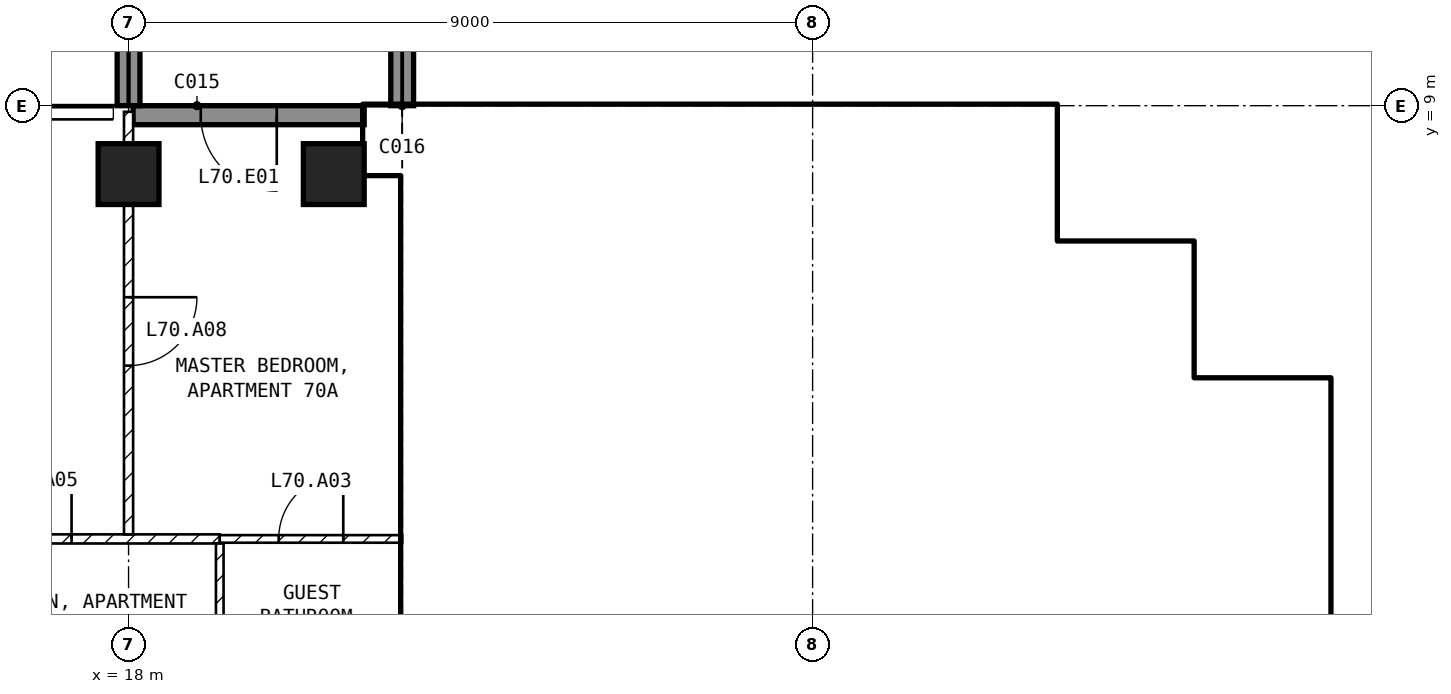
"""IFC4 building model, lengths in metres.
Left out: names, types, materials, properties, quantities, classifications, styles, units other than length and angle.
Written with IfcOpenShell. Run it as: python <this file> out.ifc"""

import sys

from ifc_helpers import new_model, si_unit, direction, frame, frame_2d, origin, origin_2d, place, context, subcontext, project, spatial, rectangle, extrude, element, fill, save


model = new_model("IFC4")
c1 = context("Model", 3, precision=1e-05, world=origin(), true_north=direction((0.0, 1.0)))
c2 = subcontext(c1, "Body", "Model", "MODEL_VIEW")
j1 = project(units=[si_unit("LENGTHUNIT", "METRE"), si_unit("PLANEANGLEUNIT", "RADIAN")], contexts=[c1])
p1 = place(None, origin())
s1 = spatial("IfcSite", under=j1, at=p1, CompositionType="ELEMENT")
p2 = place(p1, origin())
s2 = spatial("IfcBuilding", under=s1, at=p2, CompositionType="ELEMENT")
p3 = place(p2, frame((0.0, 0.0, 274.5)))
s3 = spatial("IfcBuildingStorey", under=s2, at=p3, CompositionType="ELEMENT", Elevation=274.5)
for number, where, z_axis, x_axis in (
    (1, (18.0, 8.1, -0.25), (0.0, 0.0, 1.0), (1.0, 0.0, 0.0)),
    (2, (20.7, 8.1, -0.25), (0.0, 0.0, 1.0), (1.0, 0.0, 0.0)),
):
    element("IfcColumn", number, at=place(p3, frame(where, z_axis=z_axis, x_axis=x_axis)), inside=s3, PredefinedType="COLUMN", context=c2, shape_type="SweptSolid", body=[
        extrude(rectangle(XDim=0.8, YDim=0.8, at=origin_2d()), origin(), (0.0, 0.0, 1.0), 3.5),
    ])
p4 = place(p3, frame((21.1, 8.875, 0.0), z_axis=(0.0, 0.0, 1.0), x_axis=(-1.0, 0.0, 0.0)))
e3 = element("IfcWall", 3, at=p4, inside=s3, PredefinedType="SOLIDWALL", context=c2, shape_type="SweptSolid", body=[
    extrude(rectangle(XDim=3.04, YDim=0.25, at=frame_2d((1.52, 0.0))), origin(), (0.0, 0.0, 1.0), 3.25),
])
p5 = place(p4, frame((1.15, 0.0, 0.0)))
e4 = element("IfcOpeningElement", 4, at=p5, cuts=e3, PredefinedType="OPENING", context=c2, shape_type="SweptSolid", body=[
    extrude(rectangle(XDim=1.0, YDim=2.4, at=frame_2d((0.5, 1.2))), frame((0.0, 0.135, 0.0), z_axis=(0.0, -1.0, 0.0), x_axis=(1.0, 0.0, 0.0)), (0.0, 0.0, 1.0), 0.27),
])
for number, where, z_axis, x_axis in (
    (5, (18.0, 9.0, 0.0), (0.0, 0.0, 1.0), (0.0, 1.0, 0.0)),
    (6, (21.6, 9.0, 0.0), (0.0, 0.0, 1.0), (0.0, 1.0, 0.0)),
):
    element("IfcWall", number, at=place(p3, frame(where, z_axis=z_axis, x_axis=x_axis)), inside=s3, PredefinedType="SOLIDWALL", context=c2, shape_type="SweptSolid", body=[
        extrude(rectangle(XDim=2.7, YDim=0.3, at=frame_2d((1.35, 0.0))), origin(), (0.0, 0.0, 1.0), 3.25),
    ])
p6 = place(p3, frame((33.575, -4.95, 0.0), z_axis=(0.0, 0.0, 1.0), x_axis=(0.0, 1.0, 0.0)))
e7 = element("IfcWall", 7, at=p6, inside=s3, PredefinedType="SHEAR", context=c2, shape_type="SweptSolid", body=[
    extrude(rectangle(XDim=10.35, YDim=0.45, at=frame_2d((5.175, 0.0))), origin(), (0.0, 0.0, 1.0), 3.25),
])
for number, where, z_axis, x_axis in (
    (8, (31.55, 5.175, 0.0), (0.0, 0.0, 1.0), (1.0, 0.0, 0.0)),
    (9, (31.775, 5.4, 0.0), (0.0, 0.0, 1.0), (0.0, 1.0, 0.0)),
    (10, (29.75, 6.975, 0.0), (0.0, 0.0, 1.0), (1.0, 0.0, 0.0)),
    (11, (29.975, 7.2, 0.0), (0.0, 0.0, 1.0), (0.0, 1.0, 0.0)),
):
    element("IfcWall", number, at=place(p3, frame(where, z_axis=z_axis, x_axis=x_axis)), inside=s3, PredefinedType="SHEAR", context=c2, shape_type="SweptSolid", body=[
        extrude(rectangle(XDim=1.8, YDim=0.45, at=frame_2d((0.9, 0.0))), origin(), (0.0, 0.0, 1.0), 3.25),
    ])
p7 = place(p3, frame((21.1, 8.55, 0.0), z_axis=(0.0, 0.0, 1.0), x_axis=(1.0, 0.0, 0.0)))
e12 = element("IfcWall", 12, at=p7, inside=s3, PredefinedType="SHEAR", context=c2, shape_type="SweptSolid", body=[
    extrude(rectangle(XDim=8.65, YDim=0.9, at=frame_2d((4.325, 0.0))), origin(), (0.0, 0.0, 1.0), 3.25),
])
p8 = place(p3, frame((21.825, 1.2, 0.0), z_axis=(0.0, 0.0, 1.0), x_axis=(0.0, 1.0, 0.0)))
e13 = element("IfcWall", 13, at=p8, inside=s3, PredefinedType="SHEAR", context=c2, shape_type="SweptSolid", body=[
    extrude(rectangle(XDim=6.9, YDim=0.45, at=frame_2d((3.45, 0.0))), origin(), (0.0, 0.0, 1.0), 3.25),
])
p9 = place(p3, frame((22.05, 5.15, 0.0), z_axis=(0.0, 0.0, 1.0), x_axis=(1.0, 0.0, 0.0)))
e14 = element("IfcWall", 14, at=p9, inside=s3, PredefinedType="SOLIDWALL", context=c2, shape_type="SweptSolid", body=[
    extrude(rectangle(XDim=6.3, YDim=0.2, at=frame_2d((3.15, 0.0))), origin(), (0.0, 0.0, 1.0), 3.25),
])
p10 = place(p9, frame((0.2, 0.0, 0.0)))
e15 = element("IfcOpeningElement", 15, at=p10, cuts=e14, PredefinedType="OPENING", context=c2, shape_type="SweptSolid", body=[
    extrude(rectangle(XDim=1.0, YDim=2.1, at=frame_2d((0.5, 1.05))), frame((0.0, 0.11, 0.0), z_axis=(0.0, -1.0, 0.0), x_axis=(1.0, 0.0, 0.0)), (0.0, 0.0, 1.0), 0.22),
])
p11 = place(p3, frame((28.25, 5.25, 0.0), z_axis=(0.0, 0.0, 1.0), x_axis=(0.0, 1.0, 0.0)))
e16 = element("IfcWall", 16, at=p11, inside=s3, PredefinedType="SOLIDWALL", context=c2, shape_type="SweptSolid", body=[
    extrude(rectangle(XDim=2.85, YDim=0.2, at=frame_2d((1.425, 0.0))), origin(), (0.0, 0.0, 1.0), 3.25),
])
p12 = place(p3, frame((27.2, 3.95, 0.0), z_axis=(0.0, 0.0, 1.0), x_axis=(1.0, 0.0, 0.0)))
e17 = element("IfcWall", 17, at=p12, inside=s3, PredefinedType="SOLIDWALL", context=c2, shape_type="SweptSolid", body=[
    extrude(rectangle(XDim=6.15, YDim=0.2, at=frame_2d((3.075, 0.0))), origin(), (0.0, 0.0, 1.0), 3.25),
])
p13 = place(p3, frame((27.1, 1.55, 0.0), z_axis=(0.0, 0.0, 1.0), x_axis=(0.0, 1.0, 0.0)))
e18 = element("IfcWall", 18, at=p13, inside=s3, PredefinedType="SOLIDWALL", context=c2, shape_type="SweptSolid", body=[
    extrude(rectangle(XDim=3.5, YDim=0.2, at=frame_2d((1.75, 0.0))), origin(), (0.0, 0.0, 1.0), 3.25),
])
p14 = place(p13, frame((0.6, 0.0, 0.0)))
e19 = element("IfcOpeningElement", 19, at=p14, cuts=e18, PredefinedType="OPENING", context=c2, shape_type="SweptSolid", body=[
    extrude(rectangle(XDim=1.1, YDim=2.1, at=frame_2d((0.55, 1.05))), frame((0.0, 0.11, 0.0), z_axis=(0.0, -1.0, 0.0), x_axis=(1.0, 0.0, 0.0)), (0.0, 0.0, 1.0), 0.22),
])
p15 = place(p13, frame((2.6, 0.0, 0.0)))
e20 = element("IfcOpeningElement", 20, at=p15, cuts=e18, PredefinedType="OPENING", context=c2, shape_type="SweptSolid", body=[
    extrude(rectangle(XDim=0.8, YDim=2.1, at=frame_2d((0.4, 1.05))), frame((0.0, 0.11, 0.0), z_axis=(0.0, -1.0, 0.0), x_axis=(1.0, 0.0, 0.0)), (0.0, 0.0, 1.0), 0.22),
])
p16 = place(p3, frame((30.0, 1.55, 0.0), z_axis=(0.0, 0.0, 1.0), x_axis=(0.0, 1.0, 0.0)))
e21 = element("IfcWall", 21, at=p16, inside=s3, PredefinedType="SOLIDWALL", context=c2, shape_type="SweptSolid", body=[
    extrude(rectangle(XDim=2.3, YDim=0.2, at=frame_2d((1.15, 0.0))), origin(), (0.0, 0.0, 1.0), 3.25),
])
p17 = place(p3, frame((12.39, 3.3, 0.0), z_axis=(0.0, 0.0, 1.0), x_axis=(1.0, 0.0, 0.0)))
e22 = element("IfcWall", 22, at=p17, inside=s3, PredefinedType="PARTITIONING", context=c2, shape_type="SweptSolid", body=[
    extrude(rectangle(XDim=6.81, YDim=0.12, at=frame_2d((3.405, 0.0))), origin(), (0.0, 0.0, 1.0), 3.25),
])
p18 = place(p17, frame((3.96, 0.0, 0.0)))
e23 = element("IfcOpeningElement", 23, at=p18, cuts=e22, PredefinedType="OPENING", context=c2, shape_type="SweptSolid", body=[
    extrude(rectangle(XDim=0.9, YDim=2.1, at=frame_2d((0.45, 1.05))), frame((0.0, 0.07, 0.0), z_axis=(0.0, -1.0, 0.0), x_axis=(1.0, 0.0, 0.0)), (0.0, 0.0, 1.0), 0.14),
])
p19 = place(p3, frame((19.2, 3.24, 0.0), z_axis=(0.0, 0.0, 1.0), x_axis=(0.0, -1.0, 0.0)))
e24 = element("IfcWall", 24, at=p19, inside=s3, PredefinedType="PARTITIONING", context=c2, shape_type="SweptSolid", body=[
    extrude(rectangle(XDim=1.94, YDim=0.1, at=frame_2d((0.97, 0.0))), origin(), (0.0, 0.0, 1.0), 3.25),
])
p20 = place(p3, frame((19.2, 3.3, 0.0), z_axis=(0.0, 0.0, 1.0), x_axis=(1.0, 0.0, 0.0)))
e25 = element("IfcWall", 25, at=p20, inside=s3, PredefinedType="PARTITIONING", context=c2, shape_type="SweptSolid", body=[
    extrude(rectangle(XDim=2.4, YDim=0.1, at=frame_2d((1.2, 0.0))), origin(), (0.0, 0.0, 1.0), 3.25),
])
p21 = place(p20, frame((0.775, 0.0, 0.0)))
e26 = element("IfcOpeningElement", 26, at=p21, cuts=e25, PredefinedType="OPENING", context=c2, shape_type="SweptSolid", body=[
    extrude(rectangle(XDim=0.85, YDim=2.1, at=frame_2d((0.425, 1.05))), frame((0.0, 0.06, 0.0), z_axis=(0.0, -1.0, 0.0), x_axis=(1.0, 0.0, 0.0)), (0.0, 0.0, 1.0), 0.12),
])
p22 = place(p3, frame((18.0, 8.92, 0.0), z_axis=(0.0, 0.0, 1.0), x_axis=(0.0, -1.0, 0.0)))
e27 = element("IfcWall", 27, at=p22, inside=s3, PredefinedType="PARTITIONING", context=c2, shape_type="SweptSolid", body=[
    extrude(rectangle(XDim=5.56, YDim=0.12, at=frame_2d((2.78, 0.0))), origin(), (0.0, 0.0, 1.0), 2.496),
])
p23 = place(p22, frame((2.44, 0.0, 0.0)))
e28 = element("IfcOpeningElement", 28, at=p23, cuts=e27, PredefinedType="OPENING", context=c2, shape_type="SweptSolid", body=[
    extrude(rectangle(XDim=0.9, YDim=2.1, at=frame_2d((0.45, 1.05))), frame((0.0, 0.07, 0.0), z_axis=(0.0, -1.0, 0.0), x_axis=(1.0, 0.0, 0.0)), (0.0, 0.0, 1.0), 0.14),
])
p24 = place(p5, origin())
e29 = element("IfcDoor", 29, at=p24, inside=s3, OperationType="SINGLE_SWING_LEFT", PredefinedType="DOOR", context=c2, shape_type="SweptSolid", body=[
    extrude(rectangle(XDim=1.0, YDim=2.4, at=frame_2d((0.5, 1.2))), frame((0.0, 0.025, 0.0), z_axis=(0.0, -1.0, 0.0), x_axis=(1.0, 0.0, 0.0)), (0.0, 0.0, 1.0), 0.05),
])
fill(e4, e29)
p25 = place(p14, origin())
e30 = element("IfcDoor", 30, at=p25, inside=s3, OperationType="DOUBLE_DOOR_SLIDING", PredefinedType="DOOR", context=c2, shape_type="SweptSolid", body=[
    extrude(rectangle(XDim=1.1, YDim=2.1, at=frame_2d((0.55, 1.05))), frame((0.0, 0.025, 0.0), z_axis=(0.0, -1.0, 0.0), x_axis=(1.0, 0.0, 0.0)), (0.0, 0.0, 1.0), 0.05),
])
fill(e19, e30)
p26 = place(p10, origin())
e31 = element("IfcDoor", 31, at=p26, inside=s3, OperationType="SINGLE_SWING_LEFT", PredefinedType="DOOR", context=c2, shape_type="SweptSolid", body=[
    extrude(rectangle(XDim=1.0, YDim=2.1, at=frame_2d((0.5, 1.05))), frame((0.0, 0.025, 0.0), z_axis=(0.0, -1.0, 0.0), x_axis=(1.0, 0.0, 0.0)), (0.0, 0.0, 1.0), 0.05),
])
fill(e15, e31)
p27 = place(p15, origin())
e32 = element("IfcDoor", 32, at=p27, inside=s3, OperationType="SINGLE_SWING_LEFT", PredefinedType="DOOR", context=c2, shape_type="SweptSolid", body=[
    extrude(rectangle(XDim=0.8, YDim=2.1, at=frame_2d((0.4, 1.05))), frame((0.0, 0.025, 0.0), z_axis=(0.0, -1.0, 0.0), x_axis=(1.0, 0.0, 0.0)), (0.0, 0.0, 1.0), 0.05),
])
fill(e20, e32)
p28 = place(p21, origin())
e33 = element("IfcDoor", 33, at=p28, inside=s3, OperationType="SINGLE_SWING_RIGHT", PredefinedType="DOOR", context=c2, shape_type="SweptSolid", body=[
    extrude(rectangle(XDim=0.85, YDim=2.1, at=frame_2d((0.425, 1.05))), frame((0.0, 0.025, 0.0), z_axis=(0.0, -1.0, 0.0), x_axis=(1.0, 0.0, 0.0)), (0.0, 0.0, 1.0), 0.05),
])
fill(e26, e33)
p29 = place(p18, origin())
e34 = element("IfcDoor", 34, at=p29, inside=s3, OperationType="SINGLE_SWING_RIGHT", PredefinedType="DOOR", context=c2, shape_type="SweptSolid", body=[
    extrude(rectangle(XDim=0.9, YDim=2.1, at=frame_2d((0.45, 1.05))), frame((0.0, 0.025, 0.0), z_axis=(0.0, -1.0, 0.0), x_axis=(1.0, 0.0, 0.0)), (0.0, 0.0, 1.0), 0.05),
])
fill(e23, e34)
p30 = place(p23, origin())
e35 = element("IfcDoor", 35, at=p30, inside=s3, OperationType="SINGLE_SWING_LEFT", PredefinedType="DOOR", context=c2, shape_type="SweptSolid", body=[
    extrude(rectangle(XDim=0.9, YDim=2.1, at=frame_2d((0.45, 1.05))), frame((0.0, 0.025, 0.0), z_axis=(0.0, -1.0, 0.0), x_axis=(1.0, 0.0, 0.0)), (0.0, 0.0, 1.0), 0.05),
])
fill(e28, e35)
save(model, sys.argv[1])
